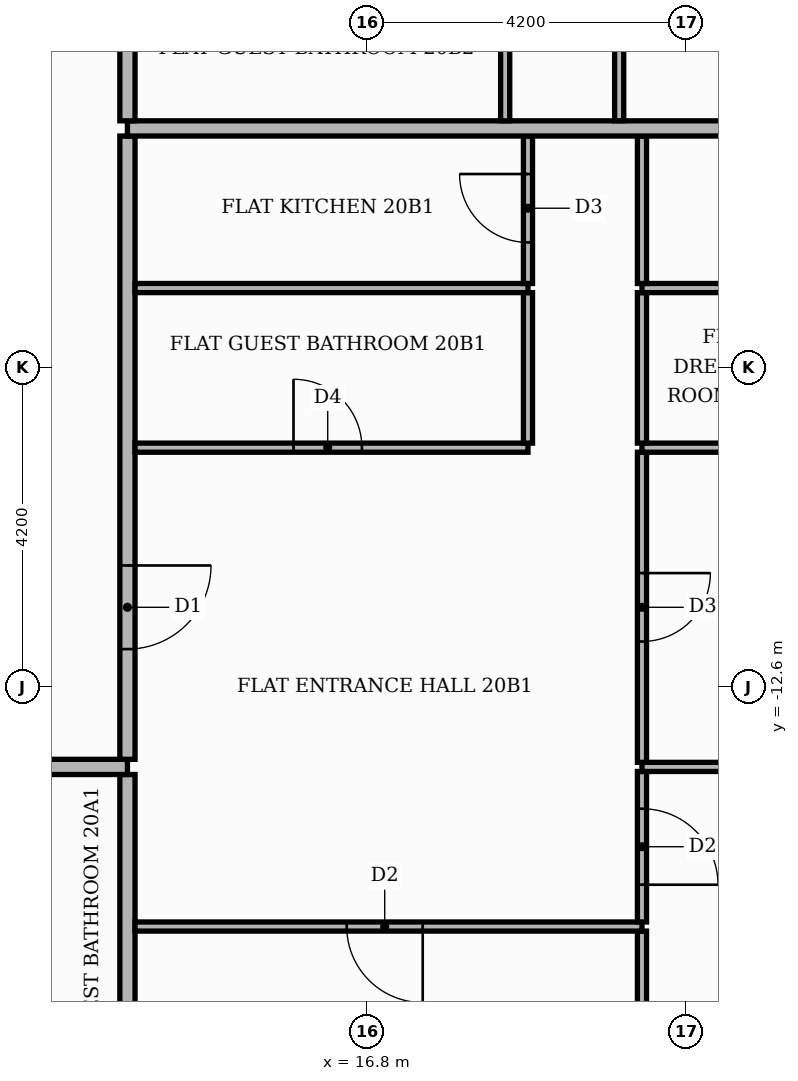
"""IFC4 building model, lengths in metres.
Left out: names, types, materials, properties, quantities, classifications, styles, units other than length and angle.
Written with IfcOpenShell. Run it as: python <this file> out.ifc"""

import sys

from ifc_helpers import new_model, si_unit, direction, frame, frame_2d, origin, place, context, subcontext, project, spatial, rectangle, extrude, element, fill, save


model = new_model("IFC4")
c1 = context("Model", 3, precision=1e-05, world=origin(), true_north=direction((0.0, 1.0)))
c2 = subcontext(c1, "Body", "Model", "MODEL_VIEW")
j1 = project(units=[si_unit("LENGTHUNIT", "METRE"), si_unit("PLANEANGLEUNIT", "RADIAN")], contexts=[c1])
p1 = place(None, origin())
s1 = spatial("IfcSite", under=j1, at=p1, CompositionType="ELEMENT")
p2 = place(p1, origin())
s2 = spatial("IfcBuilding", under=s1, at=p2, CompositionType="ELEMENT")
p3 = place(p2, frame((0.0, 0.0, 87.0)))
s3 = spatial("IfcBuildingStorey", under=s2, at=p3, CompositionType="ELEMENT", Elevation=87.0)
p4 = place(p3, frame((13.65, -25.42, 0.0), z_axis=(0.0, 0.0, 1.0), x_axis=(0.0, 1.0, 0.0)))
e1 = element("IfcWall", 1, at=p4, inside=s3, PredefinedType="PARTITIONING", context=c2, shape_type="SweptSolid", body=[
    extrude(rectangle(XDim=11.67, YDim=0.2, at=frame_2d((5.835, 0.0))), origin(), (0.0, 0.0, 1.0), 3.48),
])
p5 = place(p3, frame((20.42, -25.42, 0.0), z_axis=(0.0, 0.0, 1.0), x_axis=(0.0, 1.0, 0.0)))
e2 = element("IfcWall", 2, at=p5, inside=s3, PredefinedType="PARTITIONING", context=c2, shape_type="SweptSolid", body=[
    extrude(rectangle(XDim=9.61, YDim=0.12, at=frame_2d((4.805, 0.0))), origin(), (0.0, 0.0, 1.0), 3.48),
])
p6 = place(p3, frame((13.75, -15.75, 0.0), z_axis=(0.0, 0.0, 1.0), x_axis=(1.0, 0.0, 0.0)))
e3 = element("IfcWall", 3, at=p6, inside=s3, PredefinedType="PARTITIONING", context=c2, shape_type="SweptSolid", body=[
    extrude(rectangle(XDim=6.67, YDim=0.12, at=frame_2d((3.335, 0.0))), origin(), (0.0, 0.0, 1.0), 3.48),
])
p7 = place(p6, frame((2.785, 0.0, 0.0)))
e4 = element("IfcOpeningElement", 4, at=p7, cuts=e3, PredefinedType="OPENING", context=c2, shape_type="SweptSolid", body=[
    extrude(rectangle(XDim=1.0, YDim=2.1, at=frame_2d((0.5, 1.05))), frame((0.0, 0.07, 0.0), z_axis=(0.0, -1.0, 0.0), x_axis=(1.0, 0.0, 0.0)), (0.0, 0.0, 1.0), 0.14),
])
p8 = place(p3, frame((20.42, -15.69, 0.0), z_axis=(0.0, 0.0, 1.0), x_axis=(0.0, 1.0, 0.0)))
e5 = element("IfcWall", 5, at=p8, inside=s3, PredefinedType="PARTITIONING", context=c2, shape_type="SweptSolid", body=[
    extrude(rectangle(XDim=1.98, YDim=0.12, at=frame_2d((0.99, 0.0))), origin(), (0.0, 0.0, 1.0), 3.48),
])
p9 = place(p8, frame((0.49, 0.0, 0.0)))
e6 = element("IfcOpeningElement", 6, at=p9, cuts=e5, PredefinedType="OPENING", context=c2, shape_type="SweptSolid", body=[
    extrude(rectangle(XDim=1.0, YDim=2.1, at=frame_2d((0.5, 1.05))), frame((0.0, 0.07, 0.0), z_axis=(0.0, -1.0, 0.0), x_axis=(1.0, 0.0, 0.0)), (0.0, 0.0, 1.0), 0.14),
])
p10 = place(p3, frame((-25.42, -13.65, 0.0), z_axis=(0.0, 0.0, 1.0), x_axis=(1.0, 0.0, 0.0)))
e7 = element("IfcWall", 7, at=p10, inside=s3, PredefinedType="PARTITIONING", context=c2, shape_type="SweptSolid", body=[
    extrude(rectangle(XDim=39.07, YDim=0.2, at=frame_2d((19.535, 0.0))), origin(), (0.0, 0.0, 1.0), 3.48),
])
p11 = place(p10, frame((14.37, 0.0, 0.0)))
e8 = element("IfcOpeningElement", 8, at=p11, cuts=e7, PredefinedType="OPENING", context=c2, shape_type="SweptSolid", body=[
    extrude(rectangle(XDim=1.1, YDim=2.4, at=frame_2d((0.55, 1.2))), frame((0.0, 0.11, 0.0), z_axis=(0.0, -1.0, 0.0), x_axis=(1.0, 0.0, 0.0)), (0.0, 0.0, 1.0), 0.22),
])
p12 = place(p3, frame((20.42, -13.65, 0.0), z_axis=(0.0, 0.0, 1.0), x_axis=(1.0, 0.0, 0.0)))
e9 = element("IfcWall", 9, at=p12, inside=s3, PredefinedType="PARTITIONING", context=c2, shape_type="SweptSolid", body=[
    extrude(rectangle(XDim=5.0, YDim=0.12, at=frame_2d((2.5, 0.0))), origin(), (0.0, 0.0, 1.0), 3.48),
])
p13 = place(p3, frame((20.42, -13.59, 0.0), z_axis=(0.0, 0.0, 1.0), x_axis=(0.0, 1.0, 0.0)))
e10 = element("IfcWall", 10, at=p13, inside=s3, PredefinedType="PARTITIONING", context=c2, shape_type="SweptSolid", body=[
    extrude(rectangle(XDim=4.08, YDim=0.12, at=frame_2d((2.04, 0.0))), origin(), (0.0, 0.0, 1.0), 3.48),
])
p14 = place(p13, frame((1.59, 0.0, 0.0)))
e11 = element("IfcOpeningElement", 11, at=p14, cuts=e10, PredefinedType="OPENING", context=c2, shape_type="SweptSolid", body=[
    extrude(rectangle(XDim=0.9, YDim=2.1, at=frame_2d((0.45, 1.05))), frame((0.0, 0.07, 0.0), z_axis=(0.0, -1.0, 0.0), x_axis=(1.0, 0.0, 0.0)), (0.0, 0.0, 1.0), 0.14),
])
p15 = place(p3, frame((13.65, -13.55, 0.0), z_axis=(0.0, 0.0, 1.0), x_axis=(0.0, 1.0, 0.0)))
e12 = element("IfcWall", 12, at=p15, inside=s3, PredefinedType="PARTITIONING", context=c2, shape_type="SweptSolid", body=[
    extrude(rectangle(XDim=8.2, YDim=0.2, at=frame_2d((4.1, 0.0))), origin(), (0.0, 0.0, 1.0), 3.48),
])
p16 = place(p15, frame((1.45, 0.0, 0.0)))
e13 = element("IfcOpeningElement", 13, at=p16, cuts=e12, PredefinedType="OPENING", context=c2, shape_type="SweptSolid", body=[
    extrude(rectangle(XDim=1.1, YDim=2.4, at=frame_2d((0.55, 1.2))), frame((0.0, 0.11, 0.0), z_axis=(0.0, -1.0, 0.0), x_axis=(1.0, 0.0, 0.0)), (0.0, 0.0, 1.0), 0.22),
])
p17 = place(p3, frame((13.75, -9.45, 0.0), z_axis=(0.0, 0.0, 1.0), x_axis=(1.0, 0.0, 0.0)))
e14 = element("IfcWall", 14, at=p17, inside=s3, PredefinedType="PARTITIONING", context=c2, shape_type="SweptSolid", body=[
    extrude(rectangle(XDim=5.17, YDim=0.12, at=frame_2d((2.585, 0.0))), origin(), (0.0, 0.0, 1.0), 3.48),
])
p18 = place(p17, frame((2.085, 0.0, 0.0)))
e15 = element("IfcOpeningElement", 15, at=p18, cuts=e14, PredefinedType="OPENING", context=c2, shape_type="SweptSolid", body=[
    extrude(rectangle(XDim=0.9, YDim=2.1, at=frame_2d((0.45, 1.05))), frame((0.0, 0.07, 0.0), z_axis=(0.0, -1.0, 0.0), x_axis=(1.0, 0.0, 0.0)), (0.0, 0.0, 1.0), 0.14),
])
p19 = place(p3, frame((20.42, -9.45, 0.0), z_axis=(0.0, 0.0, 1.0), x_axis=(1.0, 0.0, 0.0)))
e16 = element("IfcWall", 16, at=p19, inside=s3, PredefinedType="PARTITIONING", context=c2, shape_type="SweptSolid", body=[
    extrude(rectangle(XDim=5.0, YDim=0.12, at=frame_2d((2.5, 0.0))), origin(), (0.0, 0.0, 1.0), 3.48),
])
p20 = place(p19, frame((2.2, 0.0, 0.0)))
e17 = element("IfcOpeningElement", 17, at=p20, cuts=e16, PredefinedType="OPENING", context=c2, shape_type="SweptSolid", body=[
    extrude(rectangle(XDim=0.9, YDim=2.1, at=frame_2d((0.45, 1.05))), frame((0.0, 0.07, 0.0), z_axis=(0.0, -1.0, 0.0), x_axis=(1.0, 0.0, 0.0)), (0.0, 0.0, 1.0), 0.14),
])
for number, where, z_axis, x_axis in (
    (18, (18.92, -9.39, 0.0), (0.0, 0.0, 1.0), (0.0, 1.0, 0.0)),
    (19, (20.42, -9.39, 0.0), (0.0, 0.0, 1.0), (0.0, 1.0, 0.0)),
):
    element("IfcWall", number, at=place(p3, frame(where, z_axis=z_axis, x_axis=x_axis)), inside=s3, PredefinedType="PARTITIONING", context=c2, shape_type="SweptSolid", body=[
        extrude(rectangle(XDim=1.98, YDim=0.12, at=frame_2d((0.99, 0.0))), origin(), (0.0, 0.0, 1.0), 3.48),
    ])
p21 = place(p3, frame((13.75, -7.35, 0.0), z_axis=(0.0, 0.0, 1.0), x_axis=(1.0, 0.0, 0.0)))
e20 = element("IfcWall", 20, at=p21, inside=s3, PredefinedType="PARTITIONING", context=c2, shape_type="SweptSolid", body=[
    extrude(rectangle(XDim=5.17, YDim=0.12, at=frame_2d((2.585, 0.0))), origin(), (0.0, 0.0, 1.0), 3.48),
])
p22 = place(p3, frame((20.42, -7.35, 0.0), z_axis=(0.0, 0.0, 1.0), x_axis=(1.0, 0.0, 0.0)))
e21 = element("IfcWall", 21, at=p22, inside=s3, PredefinedType="PARTITIONING", context=c2, shape_type="SweptSolid", body=[
    extrude(rectangle(XDim=5.0, YDim=0.12, at=frame_2d((2.5, 0.0))), origin(), (0.0, 0.0, 1.0), 3.48),
])
p23 = place(p22, frame((2.2, 0.0, 0.0)))
e22 = element("IfcOpeningElement", 22, at=p23, cuts=e21, PredefinedType="OPENING", context=c2, shape_type="SweptSolid", body=[
    extrude(rectangle(XDim=0.9, YDim=2.1, at=frame_2d((0.45, 1.05))), frame((0.0, 0.07, 0.0), z_axis=(0.0, -1.0, 0.0), x_axis=(1.0, 0.0, 0.0)), (0.0, 0.0, 1.0), 0.14),
])
p24 = place(p3, frame((18.92, -7.29, 0.0), z_axis=(0.0, 0.0, 1.0), x_axis=(0.0, 1.0, 0.0)))
e23 = element("IfcWall", 23, at=p24, inside=s3, PredefinedType="PARTITIONING", context=c2, shape_type="SweptSolid", body=[
    extrude(rectangle(XDim=1.94, YDim=0.12, at=frame_2d((0.97, 0.0))), origin(), (0.0, 0.0, 1.0), 3.48),
])
p25 = place(p24, frame((0.54, 0.0, 0.0)))
e24 = element("IfcOpeningElement", 24, at=p25, cuts=e23, PredefinedType="OPENING", context=c2, shape_type="SweptSolid", body=[
    extrude(rectangle(XDim=0.9, YDim=2.1, at=frame_2d((0.45, 1.05))), frame((0.0, 0.07, 0.0), z_axis=(0.0, -1.0, 0.0), x_axis=(1.0, 0.0, 0.0)), (0.0, 0.0, 1.0), 0.14),
])
p26 = place(p3, frame((20.42, -7.29, 0.0), z_axis=(0.0, 0.0, 1.0), x_axis=(0.0, 1.0, 0.0)))
e25 = element("IfcWall", 25, at=p26, inside=s3, PredefinedType="PARTITIONING", context=c2, shape_type="SweptSolid", body=[
    extrude(rectangle(XDim=1.94, YDim=0.12, at=frame_2d((0.97, 0.0))), origin(), (0.0, 0.0, 1.0), 3.48),
])
p27 = place(p3, frame((13.65, -5.25, 0.0), z_axis=(0.0, 0.0, 1.0), x_axis=(1.0, 0.0, 0.0)))
e26 = element("IfcWall", 26, at=p27, inside=s3, PredefinedType="PARTITIONING", context=c2, shape_type="SweptSolid", body=[
    extrude(rectangle(XDim=11.77, YDim=0.2, at=frame_2d((5.885, 0.0))), origin(), (0.0, 0.0, 1.0), 3.48),
])
p28 = place(p3, frame((13.65, -5.15, 0.0), z_axis=(0.0, 0.0, 1.0), x_axis=(0.0, 1.0, 0.0)))
e27 = element("IfcWall", 27, at=p28, inside=s3, PredefinedType="PARTITIONING", context=c2, shape_type="SweptSolid", body=[
    extrude(rectangle(XDim=18.7, YDim=0.2, at=frame_2d((9.35, 0.0))), origin(), (0.0, 0.0, 1.0), 3.48),
])
p29 = place(p28, frame((3.55, 0.0, 0.0)))
e28 = element("IfcOpeningElement", 28, at=p29, cuts=e27, PredefinedType="OPENING", context=c2, shape_type="SweptSolid", body=[
    extrude(rectangle(XDim=1.1, YDim=2.4, at=frame_2d((0.55, 1.2))), frame((0.0, 0.11, 0.0), z_axis=(0.0, -1.0, 0.0), x_axis=(1.0, 0.0, 0.0)), (0.0, 0.0, 1.0), 0.22),
])
p30 = place(p3, frame((18.62, -5.15, 0.0), z_axis=(0.0, 0.0, 1.0), x_axis=(0.0, 1.0, 0.0)))
e29 = element("IfcWall", 29, at=p30, inside=s3, PredefinedType="PARTITIONING", context=c2, shape_type="SweptSolid", body=[
    extrude(rectangle(XDim=1.94, YDim=0.12, at=frame_2d((0.97, 0.0))), origin(), (0.0, 0.0, 1.0), 3.48),
])
p31 = place(p3, frame((20.12, -5.15, 0.0), z_axis=(0.0, 0.0, 1.0), x_axis=(0.0, 1.0, 0.0)))
e30 = element("IfcWall", 30, at=p31, inside=s3, PredefinedType="PARTITIONING", context=c2, shape_type="SweptSolid", body=[
    extrude(rectangle(XDim=4.04, YDim=0.12, at=frame_2d((2.02, 0.0))), origin(), (0.0, 0.0, 1.0), 3.48),
])
p32 = place(p31, frame((1.5, 0.0, 0.0)))
e31 = element("IfcOpeningElement", 31, at=p32, cuts=e30, PredefinedType="OPENING", context=c2, shape_type="SweptSolid", body=[
    extrude(rectangle(XDim=1.0, YDim=2.1, at=frame_2d((0.5, 1.05))), frame((0.0, 0.07, 0.0), z_axis=(0.0, -1.0, 0.0), x_axis=(1.0, 0.0, 0.0)), (0.0, 0.0, 1.0), 0.14),
])
p33 = place(p16, frame((1.1, 0.0, 0.0), z_axis=(0.0, 0.0, 1.0), x_axis=(-1.0, 0.0, 0.0)))
e32 = element("IfcDoor", 32, at=p33, inside=s3, OperationType="SINGLE_SWING_RIGHT", PredefinedType="DOOR", context=c2, shape_type="SweptSolid", body=[
    extrude(rectangle(XDim=1.1, YDim=2.4, at=frame_2d((0.55, 1.2))), frame((0.0, 0.025, 0.0), z_axis=(0.0, -1.0, 0.0), x_axis=(1.0, 0.0, 0.0)), (0.0, 0.0, 1.0), 0.05),
])
fill(e13, e32)
p34 = place(p7, frame((1.0, 0.0, 0.0), z_axis=(0.0, 0.0, 1.0), x_axis=(-1.0, 0.0, 0.0)))
e33 = element("IfcDoor", 33, at=p34, inside=s3, OperationType="SINGLE_SWING_RIGHT", PredefinedType="DOOR", context=c2, shape_type="SweptSolid", body=[
    extrude(rectangle(XDim=1.0, YDim=2.1, at=frame_2d((0.5, 1.05))), frame((0.0, 0.025, 0.0), z_axis=(0.0, -1.0, 0.0), x_axis=(1.0, 0.0, 0.0)), (0.0, 0.0, 1.0), 0.05),
])
fill(e4, e33)
p35 = place(p18, origin())
e34 = element("IfcDoor", 34, at=p35, inside=s3, OperationType="SINGLE_SWING_LEFT", PredefinedType="DOOR", context=c2, shape_type="SweptSolid", body=[
    extrude(rectangle(XDim=0.9, YDim=2.1, at=frame_2d((0.45, 1.05))), frame((0.0, 0.025, 0.0), z_axis=(0.0, -1.0, 0.0), x_axis=(1.0, 0.0, 0.0)), (0.0, 0.0, 1.0), 0.05),
])
fill(e15, e34)
p36 = place(p25, origin())
e35 = element("IfcDoor", 35, at=p36, inside=s3, OperationType="SINGLE_SWING_RIGHT", PredefinedType="DOOR", context=c2, shape_type="SweptSolid", body=[
    extrude(rectangle(XDim=0.9, YDim=2.1, at=frame_2d((0.45, 1.05))), frame((0.0, 0.025, 0.0), z_axis=(0.0, -1.0, 0.0), x_axis=(1.0, 0.0, 0.0)), (0.0, 0.0, 1.0), 0.05),
])
fill(e24, e35)
p37 = place(p9, frame((1.0, 0.0, 0.0), z_axis=(0.0, 0.0, 1.0), x_axis=(-1.0, 0.0, 0.0)))
e36 = element("IfcDoor", 36, at=p37, inside=s3, OperationType="SINGLE_SWING_LEFT", PredefinedType="DOOR", context=c2, shape_type="SweptSolid", body=[
    extrude(rectangle(XDim=1.0, YDim=2.1, at=frame_2d((0.5, 1.05))), frame((0.0, 0.025, 0.0), z_axis=(0.0, -1.0, 0.0), x_axis=(1.0, 0.0, 0.0)), (0.0, 0.0, 1.0), 0.05),
])
fill(e6, e36)
p38 = place(p14, frame((0.9, 0.0, 0.0), z_axis=(0.0, 0.0, 1.0), x_axis=(-1.0, 0.0, 0.0)))
e37 = element("IfcDoor", 37, at=p38, inside=s3, OperationType="SINGLE_SWING_RIGHT", PredefinedType="DOOR", context=c2, shape_type="SweptSolid", body=[
    extrude(rectangle(XDim=0.9, YDim=2.1, at=frame_2d((0.45, 1.05))), frame((0.0, 0.025, 0.0), z_axis=(0.0, -1.0, 0.0), x_axis=(1.0, 0.0, 0.0)), (0.0, 0.0, 1.0), 0.05),
])
fill(e11, e37)
save(model, sys.argv[1])
